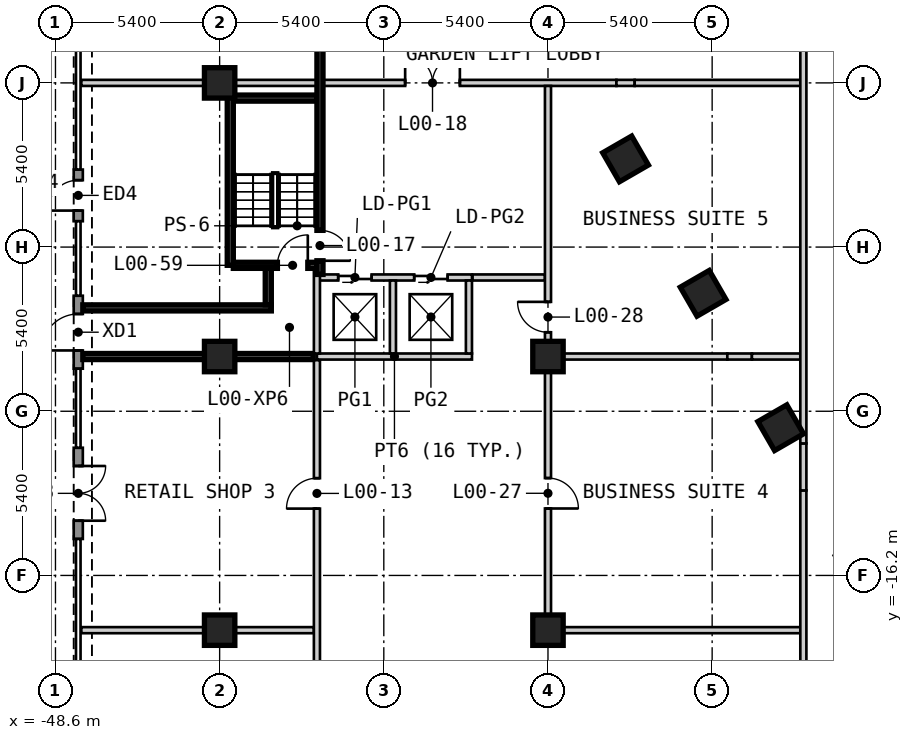
"""IFC4 building model, lengths in metres.
Left out: names, types, materials, properties, quantities, classifications, styles, units other than length and angle.
Written with IfcOpenShell. Run it as: python <this file> out.ifc"""

import sys

from ifc_helpers import new_model, si_unit, direction, frame, frame_2d, origin, origin_2d, place, context, subcontext, project, spatial, rectangle, extrude, element, fill, save


model = new_model("IFC4")
c1 = context("Model", 3, precision=1e-05, world=origin(), true_north=direction((0.0, 1.0)))
c2 = subcontext(c1, "Body", "Model", "MODEL_VIEW")
j1 = project(units=[si_unit("LENGTHUNIT", "METRE"), si_unit("PLANEANGLEUNIT", "RADIAN")], contexts=[c1])
p1 = place(None, origin())
s1 = spatial("IfcSite", under=j1, at=p1, CompositionType="ELEMENT")
p2 = place(p1, origin())
s2 = spatial("IfcBuilding", under=s1, at=p2, CompositionType="ELEMENT")
p3 = place(p2, origin())
s3 = spatial("IfcBuildingStorey", under=s2, at=p3, CompositionType="ELEMENT", Elevation=0.0)
for number, where, z_axis, x_axis in (
    (1, (-29.848, -2.5, 0.0), (0.0, 0.0, 1.0), (0.5, -0.866, 0.0)),
    (2, (-27.297, -6.921, 0.0), (0.0, 0.0, 1.0), (0.5, -0.866, 0.0)),
    (3, (-24.745, -11.341, 0.0), (0.0, 0.0, 1.0), (0.5, -0.866, 0.0)),
):
    element("IfcColumn", number, at=place(p3, frame(where, z_axis=z_axis, x_axis=x_axis)), inside=s3, PredefinedType="COLUMN", context=c2, shape_type="SweptSolid", body=[
        extrude(rectangle(XDim=1.1, YDim=1.1, at=origin_2d()), origin(), (0.0, 0.0, 1.0), 5.0),
    ])
for number, where, z_axis, x_axis in (
    (4, (-43.2, -18.0, 0.0), (0.0, 0.0, 1.0), (1.0, 0.0, 0.0)),
    (5, (-43.2, -9.0, 0.0), (0.0, 0.0, 1.0), (1.0, 0.0, 0.0)),
    (6, (-43.2, 0.0, 0.0), (0.0, 0.0, 1.0), (1.0, 0.0, 0.0)),
    (7, (-32.4, -18.0, 0.0), (0.0, 0.0, 1.0), (1.0, 0.0, 0.0)),
    (8, (-32.4, -9.0, 0.0), (0.0, 0.0, 1.0), (1.0, 0.0, 0.0)),
):
    element("IfcColumn", number, at=place(p3, frame(where, z_axis=z_axis, x_axis=x_axis)), inside=s3, PredefinedType="COLUMN", context=c2, shape_type="SweptSolid", body=[
        extrude(rectangle(XDim=1.0, YDim=1.0, at=origin_2d()), origin(), (0.0, 0.0, 1.0), 5.0),
    ])
p4 = place(p3, frame((-47.85, -2.85, 0.0), z_axis=(0.0, 0.0, 1.0), x_axis=(0.0, -1.0, 0.0)))
e9 = element("IfcWall", 9, at=p4, inside=s3, PredefinedType="SOLIDWALL", context=c2, shape_type="SweptSolid", body=[
    extrude(rectangle(XDim=1.7, YDim=0.3, at=frame_2d((0.85, 0.0))), origin(), (0.0, 0.0, 1.0), 4.55),
])
p5 = place(p4, frame((1.35, 0.0, 0.0), z_axis=(0.0, 0.0, 1.0), x_axis=(-1.0, 0.0, 0.0)))
e10 = element("IfcOpeningElement", 10, at=p5, cuts=e9, PredefinedType="OPENING", context=c2, shape_type="SweptSolid", body=[
    extrude(rectangle(XDim=1.0, YDim=2.4, at=frame_2d((0.5, 1.2))), frame((0.0, 0.16, 0.0), z_axis=(0.0, -1.0, 0.0), x_axis=(1.0, 0.0, 0.0)), (0.0, 0.0, 1.0), 0.32),
])
p6 = place(p3, frame((-47.85, -7.0, 0.0), z_axis=(0.0, 0.0, 1.0), x_axis=(0.0, -1.0, 0.0)))
e11 = element("IfcWall", 11, at=p6, inside=s3, PredefinedType="SOLIDWALL", context=c2, shape_type="SweptSolid", body=[
    extrude(rectangle(XDim=2.4, YDim=0.3, at=frame_2d((1.2, 0.0))), origin(), (0.0, 0.0, 1.0), 4.55),
])
p7 = place(p6, frame((1.8, 0.0, 0.0), z_axis=(0.0, 0.0, 1.0), x_axis=(-1.0, 0.0, 0.0)))
e12 = element("IfcOpeningElement", 12, at=p7, cuts=e11, PredefinedType="OPENING", context=c2, shape_type="SweptSolid", body=[
    extrude(rectangle(XDim=1.2, YDim=2.4, at=frame_2d((0.6, 1.2))), frame((0.0, 0.16, 0.0), z_axis=(0.0, -1.0, 0.0), x_axis=(1.0, 0.0, 0.0)), (0.0, 0.0, 1.0), 0.32),
])
p8 = place(p3, frame((-47.85, -12.0, 0.0), z_axis=(0.0, 0.0, 1.0), x_axis=(0.0, -1.0, 0.0)))
e13 = element("IfcWall", 13, at=p8, inside=s3, PredefinedType="SOLIDWALL", context=c2, shape_type="SweptSolid", body=[
    extrude(rectangle(XDim=3.0, YDim=0.3, at=frame_2d((1.5, 0.0))), origin(), (0.0, 0.0, 1.0), 4.55),
])
p9 = place(p8, frame((2.4, 0.0, 0.0), z_axis=(0.0, 0.0, 1.0), x_axis=(-1.0, 0.0, 0.0)))
e14 = element("IfcOpeningElement", 14, at=p9, cuts=e13, PredefinedType="OPENING", context=c2, shape_type="SweptSolid", body=[
    extrude(rectangle(XDim=1.8, YDim=2.4, at=frame_2d((0.9, 1.2))), frame((0.0, 0.16, 0.0), z_axis=(0.0, -1.0, 0.0), x_axis=(1.0, 0.0, 0.0)), (0.0, 0.0, 1.0), 0.32),
])
p10 = place(p3, frame((-47.75, -18.0, 0.0), z_axis=(0.0, 0.0, 1.0), x_axis=(1.0, 0.0, 0.0)))
e15 = element("IfcWall", 15, at=p10, inside=s3, PredefinedType="PARTITIONING", context=c2, shape_type="SweptSolid", body=[
    extrude(rectangle(XDim=7.65, YDim=0.2, at=frame_2d((3.825, 0.0))), origin(), (0.0, 0.0, 1.0), 4.55),
])
p11 = place(p3, frame((-32.4, -18.0, 0.0), z_axis=(0.0, 0.0, 1.0), x_axis=(1.0, 0.0, 0.0)))
e16 = element("IfcWall", 16, at=p11, inside=s3, PredefinedType="PARTITIONING", context=c2, shape_type="SweptSolid", body=[
    extrude(rectangle(XDim=8.4, YDim=0.2, at=frame_2d((4.2, 0.0))), origin(), (0.0, 0.0, 1.0), 4.55),
])
p12 = place(p3, frame((-47.7, -9.0, 0.0), z_axis=(0.0, 0.0, 1.0), x_axis=(1.0, 0.0, 0.0)))
e17 = element("IfcWall", 17, at=p12, inside=s3, PredefinedType="SOLIDWALL", context=c2, shape_type="SweptSolid", body=[
    extrude(rectangle(XDim=7.58, YDim=0.2, at=frame_2d((3.79, 0.0))), origin(), (0.0, 0.0, 1.0), 4.55),
])
p13 = place(p3, frame((-40.0, -9.0, 0.0), z_axis=(0.0, 0.0, 1.0), x_axis=(1.0, 0.0, 0.0)))
e18 = element("IfcWall", 18, at=p13, inside=s3, PredefinedType="SOLIDWALL", context=c2, shape_type="SweptSolid", body=[
    extrude(rectangle(XDim=5.1, YDim=0.2, at=frame_2d((2.55, 0.0))), origin(), (0.0, 0.0, 1.0), 4.55),
])
p14 = place(p3, frame((-32.3, -9.0, 0.0), z_axis=(0.0, 0.0, 1.0), x_axis=(1.0, 0.0, 0.0)))
e19 = element("IfcWall", 19, at=p14, inside=s3, PredefinedType="PARTITIONING", context=c2, shape_type="SweptSolid", body=[
    extrude(rectangle(XDim=5.799, YDim=0.2, at=frame_2d((2.899, 0.0))), origin(), (0.0, 0.0, 1.0), 4.55),
])
p15 = place(p3, frame((-26.501, -9.0, 0.0), z_axis=(0.0, 0.0, 1.0), x_axis=(1.0, 0.0, 0.0)))
e20 = element("IfcWall", 20, at=p15, inside=s3, PredefinedType="PARTITIONING", context=c2, shape_type="SweptSolid", body=[
    extrude(rectangle(XDim=0.809, YDim=0.2, at=frame_2d((0.405, 0.0))), origin(), (0.0, 0.0, 1.0), 3.82),
])
p16 = place(p3, frame((-25.692, -9.0, 0.0), z_axis=(0.0, 0.0, 1.0), x_axis=(1.0, 0.0, 0.0)))
e21 = element("IfcWall", 21, at=p16, inside=s3, PredefinedType="PARTITIONING", context=c2, shape_type="SweptSolid", body=[
    extrude(rectangle(XDim=1.592, YDim=0.2, at=frame_2d((0.796, 0.0))), origin(), (0.0, 0.0, 1.0), 4.55),
])
p17 = place(p3, frame((-47.7, -7.4, 0.0), z_axis=(0.0, 0.0, 1.0), x_axis=(1.0, 0.0, 0.0)))
e22 = element("IfcWall", 22, at=p17, inside=s3, PredefinedType="SOLIDWALL", context=c2, shape_type="SweptSolid", body=[
    extrude(rectangle(XDim=6.2, YDim=0.2, at=frame_2d((3.1, 0.0))), origin(), (0.0, 0.0, 1.0), 4.55),
])
p18 = place(p3, frame((-40.0, -6.4, 0.0), z_axis=(0.0, 0.0, 1.0), x_axis=(1.0, 0.0, 0.0)))
e23 = element("IfcWall", 23, at=p18, inside=s3, PredefinedType="SOLIDWALL", context=c2, shape_type="SweptSolid", body=[
    extrude(rectangle(XDim=5.1, YDim=0.2, at=frame_2d((2.55, 0.0))), origin(), (0.0, 0.0, 1.0), 4.55),
])
p19 = place(p18, frame((0.7, 0.0, 0.0)))
e24 = element("IfcOpeningElement", 24, at=p19, cuts=e23, PredefinedType="OPENING", context=c2, shape_type="SweptSolid", body=[
    extrude(rectangle(XDim=1.1, YDim=2.1, at=frame_2d((0.55, 1.05))), frame((0.0, 0.11, 0.0), z_axis=(0.0, -1.0, 0.0), x_axis=(1.0, 0.0, 0.0)), (0.0, 0.0, 1.0), 0.22),
])
p20 = place(p18, frame((3.2, 0.0, 0.0)))
e25 = element("IfcOpeningElement", 25, at=p20, cuts=e23, PredefinedType="OPENING", context=c2, shape_type="SweptSolid", body=[
    extrude(rectangle(XDim=1.1, YDim=2.1, at=frame_2d((0.55, 1.05))), frame((0.0, 0.11, 0.0), z_axis=(0.0, -1.0, 0.0), x_axis=(1.0, 0.0, 0.0)), (0.0, 0.0, 1.0), 0.22),
])
p21 = place(p3, frame((-34.88, -6.4, 0.0), z_axis=(0.0, 0.0, 1.0), x_axis=(1.0, 0.0, 0.0)))
e26 = element("IfcWall", 26, at=p21, inside=s3, PredefinedType="PARTITIONING", context=c2, shape_type="SweptSolid", body=[
    extrude(rectangle(XDim=2.38, YDim=0.2, at=frame_2d((1.19, 0.0))), origin(), (0.0, 0.0, 1.0), 4.55),
])
p22 = place(p3, frame((-42.75, -6.0, 0.0), z_axis=(0.0, 0.0, 1.0), x_axis=(1.0, 0.0, 0.0)))
e27 = element("IfcWall", 27, at=p22, inside=s3, PredefinedType="SOLIDWALL", context=c2, shape_type="SweptSolid", body=[
    extrude(rectangle(XDim=2.75, YDim=0.2, at=frame_2d((1.375, 0.0))), origin(), (0.0, 0.0, 1.0), 4.55),
])
p23 = place(p22, frame((2.45, 0.0, 0.0), z_axis=(0.0, 0.0, 1.0), x_axis=(-1.0, 0.0, 0.0)))
e28 = element("IfcOpeningElement", 28, at=p23, cuts=e27, PredefinedType="OPENING", context=c2, shape_type="SweptSolid", body=[
    extrude(rectangle(XDim=1.0, YDim=2.1, at=frame_2d((0.5, 1.05))), frame((0.0, 0.11, 0.0), z_axis=(0.0, -1.0, 0.0), x_axis=(1.0, 0.0, 0.0)), (0.0, 0.0, 1.0), 0.22),
])
p24 = place(p3, frame((-42.85, -0.5, 0.0), z_axis=(0.0, 0.0, 1.0), x_axis=(1.0, 0.0, 0.0)))
e29 = element("IfcWall", 29, at=p24, inside=s3, PredefinedType="SOLIDWALL", context=c2, shape_type="SweptSolid", body=[
    extrude(rectangle(XDim=2.85, YDim=0.2, at=frame_2d((1.425, 0.0))), origin(), (0.0, 0.0, 1.0), 4.55),
])
p25 = place(p3, frame((-47.75, 0.0, 0.0), z_axis=(0.0, 0.0, 1.0), x_axis=(1.0, 0.0, 0.0)))
e30 = element("IfcWall", 30, at=p25, inside=s3, PredefinedType="PARTITIONING", context=c2, shape_type="SweptSolid", body=[
    extrude(rectangle(XDim=7.75, YDim=0.2, at=frame_2d((3.875, 0.0))), origin(), (0.0, 0.0, 1.0), 4.55),
])
p26 = place(p3, frame((-39.8, 0.0, 0.0), z_axis=(0.0, 0.0, 1.0), x_axis=(1.0, 0.0, 0.0)))
e31 = element("IfcWall", 31, at=p26, inside=s3, PredefinedType="PARTITIONING", context=c2, shape_type="SweptSolid", body=[
    extrude(rectangle(XDim=9.651, YDim=0.2, at=frame_2d((4.826, 0.0))), origin(), (0.0, 0.0, 1.0), 4.55),
])
p27 = place(p26, frame((2.702, 0.0, 0.0)))
e32 = element("IfcOpeningElement", 32, at=p27, cuts=e31, PredefinedType="OPENING", context=c2, shape_type="SweptSolid", body=[
    extrude(rectangle(XDim=1.8, YDim=2.1, at=frame_2d((0.9, 1.05))), frame((0.0, 0.11, 0.0), z_axis=(0.0, -1.0, 0.0), x_axis=(1.0, 0.0, 0.0)), (0.0, 0.0, 1.0), 0.22),
])
p28 = place(p3, frame((-30.149, 0.0, 0.0), z_axis=(0.0, 0.0, 1.0), x_axis=(1.0, 0.0, 0.0)))
e33 = element("IfcWall", 33, at=p28, inside=s3, PredefinedType="PARTITIONING", context=c2, shape_type="SweptSolid", body=[
    extrude(rectangle(XDim=0.601, YDim=0.2, at=frame_2d((0.3, 0.0))), origin(), (0.0, 0.0, 1.0), 3.82),
])
p29 = place(p3, frame((-29.548, 0.0, 0.0), z_axis=(0.0, 0.0, 1.0), x_axis=(1.0, 0.0, 0.0)))
e34 = element("IfcWall", 34, at=p29, inside=s3, PredefinedType="PARTITIONING", context=c2, shape_type="SweptSolid", body=[
    extrude(rectangle(XDim=5.448, YDim=0.2, at=frame_2d((2.724, 0.0))), origin(), (0.0, 0.0, 1.0), 4.55),
])
p30 = place(p3, frame((-42.85, -6.0, 0.0), z_axis=(0.0, 0.0, 1.0), x_axis=(0.0, 1.0, 0.0)))
e35 = element("IfcWall", 35, at=p30, inside=s3, PredefinedType="SOLIDWALL", context=c2, shape_type="SweptSolid", body=[
    extrude(rectangle(XDim=5.9, YDim=0.2, at=frame_2d((2.95, 0.0))), origin(), (0.0, 0.0, 1.0), 4.55),
])
p31 = place(p3, frame((-41.6, -7.3, 0.0), z_axis=(0.0, 0.0, 1.0), x_axis=(0.0, 1.0, 0.0)))
e36 = element("IfcWall", 36, at=p31, inside=s3, PredefinedType="SOLIDWALL", context=c2, shape_type="SweptSolid", body=[
    extrude(rectangle(XDim=1.2, YDim=0.2, at=frame_2d((0.6, 0.0))), origin(), (0.0, 0.0, 1.0), 4.55),
])
p32 = place(p3, frame((-40.0, -26.2, 0.0), z_axis=(0.0, 0.0, 1.0), x_axis=(0.0, 1.0, 0.0)))
e37 = element("IfcWall", 37, at=p32, inside=s3, PredefinedType="PARTITIONING", context=c2, shape_type="SweptSolid", body=[
    extrude(rectangle(XDim=17.08, YDim=0.2, at=frame_2d((8.54, 0.0))), origin(), (0.0, 0.0, 1.0), 4.55),
])
p33 = place(p32, frame((3.552, 0.0, 0.0)))
e38 = element("IfcOpeningElement", 38, at=p33, cuts=e37, PredefinedType="OPENING", context=c2, shape_type="SweptSolid", body=[
    extrude(rectangle(XDim=1.0, YDim=2.1, at=frame_2d((0.5, 1.05))), frame((0.0, 0.11, 0.0), z_axis=(0.0, -1.0, 0.0), x_axis=(1.0, 0.0, 0.0)), (0.0, 0.0, 1.0), 0.22),
])
p34 = place(p32, frame((12.198, 0.0, 0.0)))
e39 = element("IfcOpeningElement", 39, at=p34, cuts=e37, PredefinedType="OPENING", context=c2, shape_type="SweptSolid", body=[
    extrude(rectangle(XDim=1.0, YDim=2.1, at=frame_2d((0.5, 1.05))), frame((0.0, 0.11, 0.0), z_axis=(0.0, -1.0, 0.0), x_axis=(1.0, 0.0, 0.0)), (0.0, 0.0, 1.0), 0.22),
])
p35 = place(p3, frame((-40.0, -8.9, 0.0), z_axis=(0.0, 0.0, 1.0), x_axis=(0.0, 1.0, 0.0)))
e40 = element("IfcWall", 40, at=p35, inside=s3, PredefinedType="SOLIDWALL", context=c2, shape_type="SweptSolid", body=[
    extrude(rectangle(XDim=2.8, YDim=0.2, at=frame_2d((1.4, 0.0))), origin(), (0.0, 0.0, 1.0), 4.55),
])
p36 = place(p3, frame((-39.9, -6.3, 0.0), z_axis=(0.0, 0.0, 1.0), x_axis=(0.0, 1.0, 0.0)))
e41 = element("IfcWall", 41, at=p36, inside=s3, PredefinedType="SOLIDWALL", context=c2, shape_type="SweptSolid", body=[
    extrude(rectangle(XDim=33.3, YDim=0.2, at=frame_2d((16.65, 0.0))), origin(), (0.0, 0.0, 1.0), 4.55),
])
p37 = place(p36, frame((10.302, 0.0, 0.0)))
e42 = element("IfcOpeningElement", 42, at=p37, cuts=e41, PredefinedType="OPENING", context=c2, shape_type="SweptSolid", body=[
    extrude(rectangle(XDim=1.0, YDim=2.1, at=frame_2d((0.5, 1.05))), frame((0.0, 0.11, 0.0), z_axis=(0.0, -1.0, 0.0), x_axis=(1.0, 0.0, 0.0)), (0.0, 0.0, 1.0), 0.22),
])
p38 = place(p36, frame((19.3, 0.0, 0.0)))
e43 = element("IfcOpeningElement", 43, at=p38, cuts=e41, PredefinedType="OPENING", context=c2, shape_type="SweptSolid", body=[
    extrude(rectangle(XDim=1.0, YDim=2.1, at=frame_2d((0.5, 1.05))), frame((0.0, 0.11, 0.0), z_axis=(0.0, -1.0, 0.0), x_axis=(1.0, 0.0, 0.0)), (0.0, 0.0, 1.0), 0.22),
])
p39 = place(p36, frame((28.298, 0.0, 0.0)))
e44 = element("IfcOpeningElement", 44, at=p39, cuts=e41, PredefinedType="OPENING", context=c2, shape_type="SweptSolid", body=[
    extrude(rectangle(XDim=1.0, YDim=2.1, at=frame_2d((0.5, 1.05))), frame((0.0, 0.11, 0.0), z_axis=(0.0, -1.0, 0.0), x_axis=(1.0, 0.0, 0.0)), (0.0, 0.0, 1.0), 0.22),
])
p40 = place(p36, frame((1.45, 0.0, 0.0), z_axis=(0.0, 0.0, 1.0), x_axis=(-1.0, 0.0, 0.0)))
e45 = element("IfcOpeningElement", 45, at=p40, cuts=e41, PredefinedType="OPENING", context=c2, shape_type="SweptSolid", body=[
    extrude(rectangle(XDim=1.0, YDim=2.1, at=frame_2d((0.5, 1.05))), frame((0.0, 0.11, 0.0), z_axis=(0.0, -1.0, 0.0), x_axis=(1.0, 0.0, 0.0)), (0.0, 0.0, 1.0), 0.22),
])
for number, where, z_axis, x_axis in (
    (46, (-37.5, -8.9, 0.0), (0.0, 0.0, 1.0), (0.0, 1.0, 0.0)),
    (47, (-35.0, -8.9, 0.0), (0.0, 0.0, 1.0), (0.0, 1.0, 0.0)),
):
    element("IfcWall", number, at=place(p3, frame(where, z_axis=z_axis, x_axis=x_axis)), inside=s3, PredefinedType="SOLIDWALL", context=c2, shape_type="SweptSolid", body=[
        extrude(rectangle(XDim=2.4, YDim=0.2, at=frame_2d((1.2, 0.0))), origin(), (0.0, 0.0, 1.0), 4.55),
    ])
p41 = place(p3, frame((-32.4, -17.9, 0.0), z_axis=(0.0, 0.0, 1.0), x_axis=(0.0, 1.0, 0.0)))
e48 = element("IfcWall", 48, at=p41, inside=s3, PredefinedType="PARTITIONING", context=c2, shape_type="SweptSolid", body=[
    extrude(rectangle(XDim=17.8, YDim=0.2, at=frame_2d((8.9, 0.0))), origin(), (0.0, 0.0, 1.0), 4.55),
])
p42 = place(p41, frame((4.902, 0.0, 0.0), z_axis=(0.0, 0.0, 1.0), x_axis=(-1.0, 0.0, 0.0)))
e49 = element("IfcOpeningElement", 49, at=p42, cuts=e48, PredefinedType="OPENING", context=c2, shape_type="SweptSolid", body=[
    extrude(rectangle(XDim=1.0, YDim=2.1, at=frame_2d((0.5, 1.05))), frame((0.0, 0.11, 0.0), z_axis=(0.0, -1.0, 0.0), x_axis=(1.0, 0.0, 0.0)), (0.0, 0.0, 1.0), 0.22),
])
p43 = place(p41, frame((10.698, 0.0, 0.0), z_axis=(0.0, 0.0, 1.0), x_axis=(-1.0, 0.0, 0.0)))
e50 = element("IfcOpeningElement", 50, at=p43, cuts=e48, PredefinedType="OPENING", context=c2, shape_type="SweptSolid", body=[
    extrude(rectangle(XDim=1.0, YDim=2.1, at=frame_2d((0.5, 1.05))), frame((0.0, 0.11, 0.0), z_axis=(0.0, -1.0, 0.0), x_axis=(1.0, 0.0, 0.0)), (0.0, 0.0, 1.0), 0.22),
])
p44 = place(p3, frame((-24.0, -31.75, 0.0), z_axis=(0.0, 0.0, 1.0), x_axis=(0.0, 1.0, 0.0)))
e51 = element("IfcWall", 51, at=p44, inside=s3, PredefinedType="SOLIDWALL", context=c2, shape_type="SweptSolid", body=[
    extrude(rectangle(XDim=18.346, YDim=0.2, at=frame_2d((9.173, 0.0))), origin(), (0.0, 0.0, 1.0), 4.55),
])
p45 = place(p44, frame((2.05, 0.0, 0.0), z_axis=(0.0, 0.0, 1.0), x_axis=(-1.0, 0.0, 0.0)))
e52 = element("IfcOpeningElement", 52, at=p45, cuts=e51, PredefinedType="OPENING", context=c2, shape_type="SweptSolid", body=[
    extrude(rectangle(XDim=1.0, YDim=2.1, at=frame_2d((0.5, 1.05))), frame((0.0, 0.11, 0.0), z_axis=(0.0, -1.0, 0.0), x_axis=(1.0, 0.0, 0.0)), (0.0, 0.0, 1.0), 0.22),
])
p46 = place(p44, frame((8.35, 0.0, 0.0)))
e53 = element("IfcOpeningElement", 53, at=p46, cuts=e51, PredefinedType="OPENING", context=c2, shape_type="SweptSolid", body=[
    extrude(rectangle(XDim=1.8, YDim=2.1, at=frame_2d((0.9, 1.05))), frame((0.0, 0.11, 0.0), z_axis=(0.0, -1.0, 0.0), x_axis=(1.0, 0.0, 0.0)), (0.0, 0.0, 1.0), 0.22),
])
p47 = place(p3, frame((-24.0, -13.404, 0.0), z_axis=(0.0, 0.0, 1.0), x_axis=(0.0, 1.0, 0.0)))
e54 = element("IfcWall", 54, at=p47, inside=s3, PredefinedType="SOLIDWALL", context=c2, shape_type="SweptSolid", body=[
    extrude(rectangle(XDim=1.546, YDim=0.2, at=frame_2d((0.773, 0.0))), origin(), (0.0, 0.0, 1.0), 3.82),
])
p48 = place(p3, frame((-24.0, -11.858, 0.0), z_axis=(0.0, 0.0, 1.0), x_axis=(0.0, 1.0, 0.0)))
e55 = element("IfcWall", 55, at=p48, inside=s3, PredefinedType="SOLIDWALL", context=c2, shape_type="SweptSolid", body=[
    extrude(rectangle(XDim=13.758, YDim=0.2, at=frame_2d((6.879, 0.0))), origin(), (0.0, 0.0, 1.0), 4.55),
])
p49 = place(p5, origin())
e56 = element("IfcDoor", 56, at=p49, inside=s3, OperationType="SINGLE_SWING_RIGHT", PredefinedType="DOOR", context=c2, shape_type="SweptSolid", body=[
    extrude(rectangle(XDim=1.0, YDim=2.4, at=frame_2d((0.5, 1.2))), frame((0.0, 0.025, 0.0), z_axis=(0.0, -1.0, 0.0), x_axis=(1.0, 0.0, 0.0)), (0.0, 0.0, 1.0), 0.05),
])
fill(e10, e56)
p50 = place(p7, origin())
e57 = element("IfcDoor", 57, at=p50, inside=s3, OperationType="SINGLE_SWING_RIGHT", PredefinedType="DOOR", context=c2, shape_type="SweptSolid", body=[
    extrude(rectangle(XDim=1.2, YDim=2.4, at=frame_2d((0.6, 1.2))), frame((0.0, 0.025, 0.0), z_axis=(0.0, -1.0, 0.0), x_axis=(1.0, 0.0, 0.0)), (0.0, 0.0, 1.0), 0.05),
])
fill(e12, e57)
p51 = place(p9, origin())
e58 = element("IfcDoor", 58, at=p51, inside=s3, OperationType="DOUBLE_DOOR_DOUBLE_SWING", PredefinedType="DOOR", context=c2, shape_type="SweptSolid", body=[
    extrude(rectangle(XDim=1.8, YDim=2.4, at=frame_2d((0.9, 1.2))), frame((0.0, 0.025, 0.0), z_axis=(0.0, -1.0, 0.0), x_axis=(1.0, 0.0, 0.0)), (0.0, 0.0, 1.0), 0.05),
])
fill(e14, e58)
p52 = place(p34, origin())
e59 = element("IfcDoor", 59, at=p52, inside=s3, OperationType="SINGLE_SWING_LEFT", PredefinedType="DOOR", context=c2, shape_type="SweptSolid", body=[
    extrude(rectangle(XDim=1.0, YDim=2.1, at=frame_2d((0.5, 1.05))), frame((0.0, 0.025, 0.0), z_axis=(0.0, -1.0, 0.0), x_axis=(1.0, 0.0, 0.0)), (0.0, 0.0, 1.0), 0.05),
])
fill(e39, e59)
p53 = place(p40, origin())
e60 = element("IfcDoor", 60, at=p53, inside=s3, OperationType="SINGLE_SWING_RIGHT", PredefinedType="DOOR", context=c2, shape_type="SweptSolid", body=[
    extrude(rectangle(XDim=1.0, YDim=2.1, at=frame_2d((0.5, 1.05))), frame((0.0, 0.025, 0.0), z_axis=(0.0, -1.0, 0.0), x_axis=(1.0, 0.0, 0.0)), (0.0, 0.0, 1.0), 0.05),
])
fill(e45, e60)
p54 = place(p27, origin())
e61 = element("IfcDoor", 61, at=p54, inside=s3, OperationType="DOUBLE_DOOR_SINGLE_SWING", PredefinedType="DOOR", context=c2, shape_type="SweptSolid", body=[
    extrude(rectangle(XDim=1.8, YDim=2.1, at=frame_2d((0.9, 1.05))), frame((0.0, 0.025, 0.0), z_axis=(0.0, -1.0, 0.0), x_axis=(1.0, 0.0, 0.0)), (0.0, 0.0, 1.0), 0.05),
])
fill(e32, e61)
p55 = place(p42, origin())
e62 = element("IfcDoor", 62, at=p55, inside=s3, OperationType="SINGLE_SWING_RIGHT", PredefinedType="DOOR", context=c2, shape_type="SweptSolid", body=[
    extrude(rectangle(XDim=1.0, YDim=2.1, at=frame_2d((0.5, 1.05))), frame((0.0, 0.025, 0.0), z_axis=(0.0, -1.0, 0.0), x_axis=(1.0, 0.0, 0.0)), (0.0, 0.0, 1.0), 0.05),
])
fill(e49, e62)
p56 = place(p43, origin())
e63 = element("IfcDoor", 63, at=p56, inside=s3, OperationType="SINGLE_SWING_LEFT", PredefinedType="DOOR", context=c2, shape_type="SweptSolid", body=[
    extrude(rectangle(XDim=1.0, YDim=2.1, at=frame_2d((0.5, 1.05))), frame((0.0, 0.025, 0.0), z_axis=(0.0, -1.0, 0.0), x_axis=(1.0, 0.0, 0.0)), (0.0, 0.0, 1.0), 0.05),
])
fill(e50, e63)
p57 = place(p19, origin())
e64 = element("IfcDoor", 64, at=p57, inside=s3, OperationType="DOUBLE_DOOR_SLIDING", PredefinedType="DOOR", context=c2, shape_type="SweptSolid", body=[
    extrude(rectangle(XDim=1.1, YDim=2.1, at=frame_2d((0.55, 1.05))), frame((0.0, 0.025, 0.0), z_axis=(0.0, -1.0, 0.0), x_axis=(1.0, 0.0, 0.0)), (0.0, 0.0, 1.0), 0.05),
])
fill(e24, e64)
p58 = place(p20, origin())
e65 = element("IfcDoor", 65, at=p58, inside=s3, OperationType="DOUBLE_DOOR_SLIDING", PredefinedType="DOOR", context=c2, shape_type="SweptSolid", body=[
    extrude(rectangle(XDim=1.1, YDim=2.1, at=frame_2d((0.55, 1.05))), frame((0.0, 0.025, 0.0), z_axis=(0.0, -1.0, 0.0), x_axis=(1.0, 0.0, 0.0)), (0.0, 0.0, 1.0), 0.05),
])
fill(e25, e65)
p59 = place(p23, origin())
e66 = element("IfcDoor", 66, at=p59, inside=s3, OperationType="SINGLE_SWING_LEFT", PredefinedType="DOOR", context=c2, shape_type="SweptSolid", body=[
    extrude(rectangle(XDim=1.0, YDim=2.1, at=frame_2d((0.5, 1.05))), frame((0.0, 0.025, 0.0), z_axis=(0.0, -1.0, 0.0), x_axis=(1.0, 0.0, 0.0)), (0.0, 0.0, 1.0), 0.05),
])
fill(e28, e66)
save(model, sys.argv[1])
